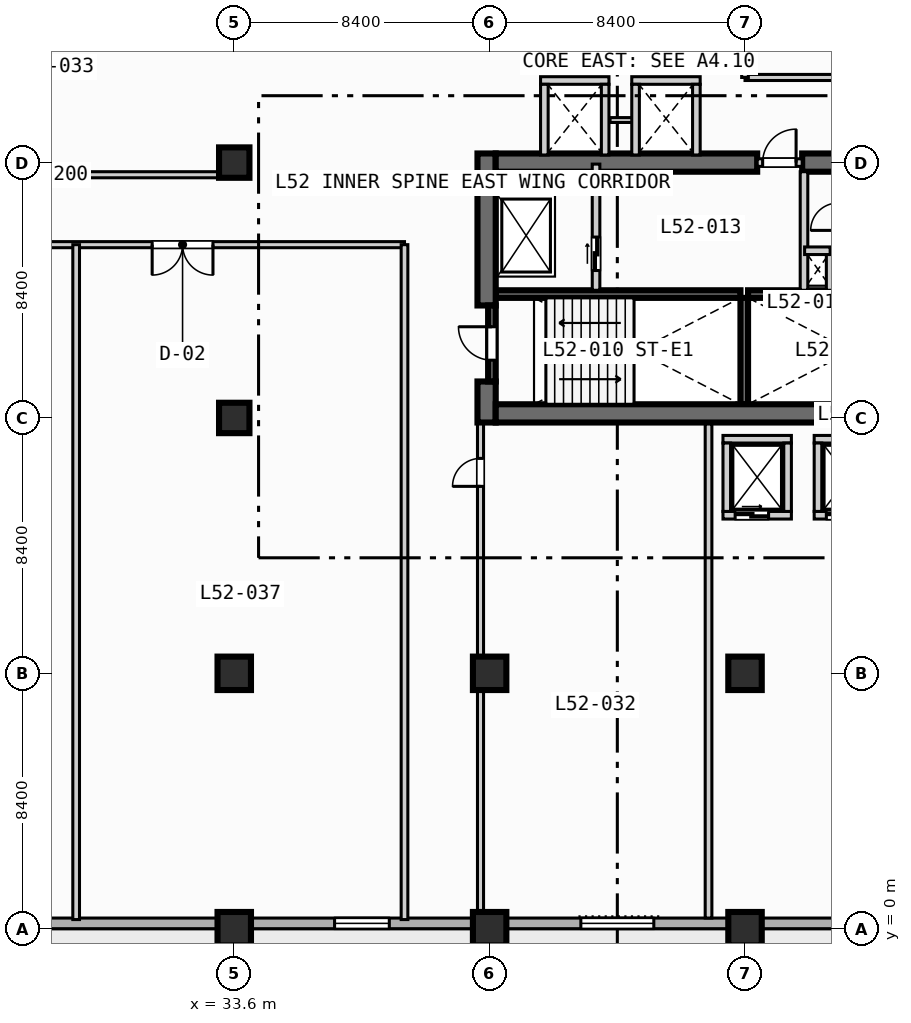
"""IFC4 building model, lengths in metres.
Left out: names, types, materials, properties, quantities, classifications, styles, units other than length and angle.
Written with IfcOpenShell. Run it as: python <this file> out.ifc"""

import sys

from ifc_helpers import new_model, si_unit, direction, frame, frame_2d, origin, origin_2d, place, context, subcontext, project, spatial, rectangle, extrude, element, fill, save


model = new_model("IFC4")
c1 = context("Model", 3, precision=1e-05, world=origin(), true_north=direction((0.0, 1.0)))
c2 = subcontext(c1, "Body", "Model", "MODEL_VIEW")
j1 = project(units=[si_unit("LENGTHUNIT", "METRE"), si_unit("PLANEANGLEUNIT", "RADIAN")], contexts=[c1])
p1 = place(None, origin())
s1 = spatial("IfcSite", under=j1, at=p1, CompositionType="ELEMENT")
p2 = place(p1, origin())
s2 = spatial("IfcBuilding", under=s1, at=p2, CompositionType="ELEMENT")
p3 = place(p2, frame((0.0, 0.0, 212.4)))
s3 = spatial("IfcBuildingStorey", under=s2, at=p3, CompositionType="ELEMENT", Elevation=212.4)
for number, where, z_axis, x_axis in (
    (1, (42.2, 20.875, 0.0), (0.0, 0.0, 1.0), (1.0, 0.0, 0.0)),
    (2, (50.5, 20.875, 0.0), (0.0, 0.0, 1.0), (1.0, 0.0, 0.0)),
):
    element("IfcWall", number, at=place(p3, frame(where, z_axis=z_axis, x_axis=x_axis)), inside=s3, PredefinedType="SOLIDWALL", context=c2, shape_type="SweptSolid", body=[
        extrude(rectangle(XDim=8.05, YDim=0.25, at=frame_2d((4.025, 0.0))), origin(), (0.0, 0.0, 1.0), 3.47),
    ])
p4 = place(p3, frame((50.375, 17.25, 0.0), z_axis=(0.0, 0.0, 1.0), x_axis=(0.0, 1.0, 0.0)))
e3 = element("IfcWall", 3, at=p4, inside=s3, PredefinedType="SOLIDWALL", context=c2, shape_type="SweptSolid", body=[
    extrude(rectangle(XDim=3.5, YDim=0.25, at=frame_2d((1.75, 0.0))), origin(), (0.0, 0.0, 1.0), 3.47),
])
p5 = place(p3, frame((41.9, 16.65, 0.0), z_axis=(0.0, 0.0, 1.0), x_axis=(0.0, 1.0, 0.0)))
e4 = element("IfcWall", 4, at=p5, inside=s3, PredefinedType="SHEAR", context=c2, shape_type="SweptSolid", body=[
    extrude(rectangle(XDim=1.35, YDim=0.6, at=frame_2d((0.675, 0.0))), origin(), (0.0, 0.0, 1.0), 3.47),
])
p6 = place(p3, frame((41.9, 20.5, 0.0), z_axis=(0.0, 0.0, 1.0), x_axis=(0.0, 1.0, 0.0)))
e5 = element("IfcWall", 5, at=p6, inside=s3, PredefinedType="SHEAR", context=c2, shape_type="SweptSolid", body=[
    extrude(rectangle(XDim=5.0, YDim=0.6, at=frame_2d((2.5, 0.0))), origin(), (0.0, 0.0, 1.0), 3.47),
])
p7 = place(p3, frame((42.2, 16.95, 0.0), z_axis=(0.0, 0.0, 1.0), x_axis=(1.0, 0.0, 0.0)))
e6 = element("IfcWall", 6, at=p7, inside=s3, PredefinedType="SHEAR", context=c2, shape_type="SweptSolid", body=[
    extrude(rectangle(XDim=16.35, YDim=0.6, at=frame_2d((8.175, 0.0))), origin(), (0.0, 0.0, 1.0), 3.47),
])
p8 = place(p3, frame((42.2, 25.2, 0.0), z_axis=(0.0, 0.0, 1.0), x_axis=(1.0, 0.0, 0.0)))
e7 = element("IfcWall", 7, at=p8, inside=s3, PredefinedType="SHEAR", context=c2, shape_type="SweptSolid", body=[
    extrude(rectangle(XDim=8.6, YDim=0.6, at=frame_2d((4.3, 0.0))), origin(), (0.0, 0.0, 1.0), 3.47),
])
p9 = place(p3, frame((52.28, 25.2, 0.0), z_axis=(0.0, 0.0, 1.0), x_axis=(1.0, 0.0, 0.0)))
e8 = element("IfcWall", 8, at=p9, inside=s3, PredefinedType="SHEAR", context=c2, shape_type="SweptSolid", body=[
    extrude(rectangle(XDim=1.27, YDim=0.6, at=frame_2d((0.635, 0.0))), origin(), (0.0, 0.0, 1.0), 3.47),
])
for number, where, z_axis, x_axis in (
    (9, (33.6, 0.0, 0.0), (0.0, 0.0, 1.0), (1.0, 0.0, 0.0)),
    (10, (33.6, 8.4, 0.0), (0.0, 0.0, 1.0), (1.0, 0.0, 0.0)),
):
    element("IfcColumn", number, at=place(p3, frame(where, z_axis=z_axis, x_axis=x_axis)), inside=s3, PredefinedType="COLUMN", context=c2, shape_type="SweptSolid", body=[
        extrude(rectangle(XDim=1.1, YDim=1.1, at=origin_2d()), origin(), (0.0, 0.0, 1.0), 3.7),
    ])
for number, where, z_axis, x_axis in (
    (11, (33.6, 16.8, 0.0), (0.0, 0.0, 1.0), (1.0, 0.0, 0.0)),
    (12, (33.6, 25.2, 0.0), (0.0, 0.0, 1.0), (1.0, 0.0, 0.0)),
):
    element("IfcColumn", number, at=place(p3, frame(where, z_axis=z_axis, x_axis=x_axis)), inside=s3, PredefinedType="COLUMN", context=c2, shape_type="SweptSolid", body=[
        extrude(rectangle(XDim=1.0, YDim=1.0, at=origin_2d()), origin(), (0.0, 0.0, 1.0), 3.7),
    ])
for number, where, z_axis, x_axis in (
    (13, (42.0, 0.0, 0.0), (0.0, 0.0, 1.0), (1.0, 0.0, 0.0)),
    (14, (42.0, 8.4, 0.0), (0.0, 0.0, 1.0), (1.0, 0.0, 0.0)),
    (15, (50.4, 0.0, 0.0), (0.0, 0.0, 1.0), (1.0, 0.0, 0.0)),
    (16, (50.4, 8.4, 0.0), (0.0, 0.0, 1.0), (1.0, 0.0, 0.0)),
):
    element("IfcColumn", number, at=place(p3, frame(where, z_axis=z_axis, x_axis=x_axis)), inside=s3, PredefinedType="COLUMN", context=c2, shape_type="SweptSolid", body=[
        extrude(rectangle(XDim=1.1, YDim=1.1, at=origin_2d()), origin(), (0.0, 0.0, 1.0), 3.7),
    ])
p10 = place(p3, frame((72.425, 0.175, 0.0), z_axis=(0.0, 0.0, 1.0), x_axis=(-1.0, 0.0, 0.0)))
e17 = element("IfcWall", 17, at=p10, inside=s3, PredefinedType="STANDARD", context=c2, shape_type="SweptSolid", body=[
    extrude(rectangle(XDim=69.25, YDim=0.35, at=frame_2d((34.625, 0.0))), origin(), (0.0, 0.0, 1.0), 3.47),
])
p11 = place(p10, frame((50.725, 0.0, 0.0)))
e18 = element("IfcOpeningElement", 18, at=p11, cuts=e17, PredefinedType="OPENING", context=c2, shape_type="SweptSolid", body=[
    extrude(rectangle(XDim=1.4, YDim=2.2, at=frame_2d((0.7, 1.1))), frame((0.0, 0.185, 0.0), z_axis=(0.0, -1.0, 0.0), x_axis=(1.0, 0.0, 0.0)), (0.0, 0.0, 1.0), 0.37),
])
p12 = place(p10, frame((58.625, 0.0, 0.85)))
e19 = element("IfcOpeningElement", 19, at=p12, cuts=e17, PredefinedType="OPENING", context=c2, shape_type="SweptSolid", body=[
    extrude(rectangle(XDim=2.4, YDim=1.95, at=frame_2d((1.2, 0.975))), frame((0.0, 0.185, 0.0), z_axis=(0.0, -1.0, 0.0), x_axis=(1.0, 0.0, 0.0)), (0.0, 0.0, 1.0), 0.37),
])
p13 = place(p10, frame((33.725, 0.0, 0.85)))
e20 = element("IfcOpeningElement", 20, at=p13, cuts=e17, PredefinedType="OPENING", context=c2, shape_type="SweptSolid", body=[
    extrude(rectangle(XDim=1.8, YDim=1.8, at=frame_2d((0.9, 0.9))), frame((0.0, 0.185, 0.0), z_axis=(0.0, -1.0, 0.0), x_axis=(1.0, 0.0, 0.0)), (0.0, 0.0, 1.0), 0.37),
])
p14 = place(p10, frame((25.025, 0.0, 0.85)))
e21 = element("IfcOpeningElement", 21, at=p14, cuts=e17, PredefinedType="OPENING", context=c2, shape_type="SweptSolid", body=[
    extrude(rectangle(XDim=2.4, YDim=1.95, at=frame_2d((1.2, 0.975))), frame((0.0, 0.185, 0.0), z_axis=(0.0, -1.0, 0.0), x_axis=(1.0, 0.0, 0.0)), (0.0, 0.0, 1.0), 0.37),
])
p15 = place(p10, frame((9.075, 0.0, 0.85)))
e22 = element("IfcOpeningElement", 22, at=p15, cuts=e17, PredefinedType="OPENING", context=c2, shape_type="SweptSolid", body=[
    extrude(rectangle(XDim=1.8, YDim=1.8, at=frame_2d((0.9, 0.9))), frame((0.0, 0.185, 0.0), z_axis=(0.0, -1.0, 0.0), x_axis=(1.0, 0.0, 0.0)), (0.0, 0.0, 1.0), 0.37),
])
p16 = place(p10, frame((2.675, 0.0, 0.85)))
e23 = element("IfcOpeningElement", 23, at=p16, cuts=e17, PredefinedType="OPENING", context=c2, shape_type="SweptSolid", body=[
    extrude(rectangle(XDim=1.8, YDim=1.8, at=frame_2d((0.9, 0.9))), frame((0.0, 0.185, 0.0), z_axis=(0.0, -1.0, 0.0), x_axis=(1.0, 0.0, 0.0)), (0.0, 0.0, 1.0), 0.37),
])
p17 = place(p3, frame((42.075, 18.0, 0.0), z_axis=(0.0, 0.0, 1.0), x_axis=(0.0, 1.0, 0.0)))
e24 = element("IfcWall", 24, at=p17, inside=s3, PredefinedType="SOLIDWALL", context=c2, shape_type="SweptSolid", body=[
    extrude(rectangle(XDim=2.5, YDim=0.25, at=frame_2d((1.25, 0.0))), origin(), (0.0, 0.0, 1.0), 3.47),
])
p18 = place(p17, frame((0.7, 0.0, 0.0)))
e25 = element("IfcOpeningElement", 25, at=p18, cuts=e24, PredefinedType="OPENING", context=c2, shape_type="SweptSolid", body=[
    extrude(rectangle(XDim=1.1, YDim=2.15, at=frame_2d((0.55, 1.075))), frame((0.0, 0.135, 0.0), z_axis=(0.0, -1.0, 0.0), x_axis=(1.0, 0.0, 0.0)), (0.0, 0.0, 1.0), 0.27),
])
p19 = place(p3, frame((45.5, 21.0, 0.0), z_axis=(0.0, 0.0, 1.0), x_axis=(0.0, 1.0, 0.0)))
e26 = element("IfcWall", 26, at=p19, inside=s3, PredefinedType="SOLIDWALL", context=c2, shape_type="SweptSolid", body=[
    extrude(rectangle(XDim=4.15, YDim=0.25, at=frame_2d((2.075, 0.0))), origin(), (0.0, 0.0, 1.0), 3.47),
])
p20 = place(p19, frame((0.65, 0.0, 0.0)))
e27 = element("IfcOpeningElement", 27, at=p20, cuts=e26, PredefinedType="OPENING", context=c2, shape_type="SweptSolid", body=[
    extrude(rectangle(XDim=1.1, YDim=2.15, at=frame_2d((0.55, 1.075))), frame((0.0, 0.135, 0.0), z_axis=(0.0, -1.0, 0.0), x_axis=(1.0, 0.0, 0.0)), (0.0, 0.0, 1.0), 0.27),
])
p21 = place(p3, frame((50.8, 25.2, 0.0), z_axis=(0.0, 0.0, 1.0), x_axis=(1.0, 0.0, 0.0)))
e28 = element("IfcWall", 28, at=p21, inside=s3, PredefinedType="SOLIDWALL", context=c2, shape_type="SweptSolid", body=[
    extrude(rectangle(XDim=1.48, YDim=0.25, at=frame_2d((0.74, 0.0))), origin(), (0.0, 0.0, 1.0), 3.47),
])
p22 = place(p21, frame((0.18, 0.0, 0.0)))
e29 = element("IfcOpeningElement", 29, at=p22, cuts=e28, PredefinedType="OPENING", context=c2, shape_type="SweptSolid", body=[
    extrude(rectangle(XDim=1.1, YDim=2.15, at=frame_2d((0.55, 1.075))), frame((0.0, 0.135, 0.0), z_axis=(0.0, -1.0, 0.0), x_axis=(1.0, 0.0, 0.0)), (0.0, 0.0, 1.0), 0.27),
])
p23 = place(p3, frame((52.34, 21.0, 0.0), z_axis=(0.0, 0.0, 1.0), x_axis=(0.0, 1.0, 0.0)))
e30 = element("IfcWall", 30, at=p23, inside=s3, PredefinedType="SOLIDWALL", context=c2, shape_type="SweptSolid", body=[
    extrude(rectangle(XDim=3.9, YDim=0.25, at=frame_2d((1.95, 0.0))), origin(), (0.0, 0.0, 1.0), 3.47),
])
p24 = place(p3, frame((53.2, 21.0, 0.0), z_axis=(0.0, 0.0, 1.0), x_axis=(0.0, 1.0, 0.0)))
e31 = element("IfcWall", 31, at=p24, inside=s3, PredefinedType="SOLIDWALL", context=c2, shape_type="SweptSolid", body=[
    extrude(rectangle(XDim=1.3, YDim=0.25, at=frame_2d((0.65, 0.0))), origin(), (0.0, 0.0, 1.0), 3.47),
])
p25 = place(p3, frame((52.36, 22.3, 0.0), z_axis=(0.0, 0.0, 1.0), x_axis=(1.0, 0.0, 0.0)))
e32 = element("IfcWall", 32, at=p25, inside=s3, PredefinedType="SOLIDWALL", context=c2, shape_type="SweptSolid", body=[
    extrude(rectangle(XDim=0.84, YDim=0.25, at=frame_2d((0.42, 0.0))), origin(), (0.0, 0.0, 1.0), 3.47),
])
p26 = place(p3, frame((49.675, 13.6, 0.0), z_axis=(0.0, 0.0, 1.0), x_axis=(1.0, 0.0, 0.0)))
e33 = element("IfcWall", 33, at=p26, inside=s3, PredefinedType="SOLIDWALL", context=c2, shape_type="SweptSolid", body=[
    extrude(rectangle(XDim=2.25, YDim=0.25, at=frame_2d((1.125, 0.0))), origin(), (0.0, 0.0, 1.0), 3.47),
])
p27 = place(p26, frame((0.4, 0.0, 0.0)))
e34 = element("IfcOpeningElement", 34, at=p27, cuts=e33, PredefinedType="OPENING", context=c2, shape_type="SweptSolid", body=[
    extrude(rectangle(XDim=1.1, YDim=2.15, at=frame_2d((0.55, 1.075))), frame((0.0, 0.135, 0.0), z_axis=(0.0, -1.0, 0.0), x_axis=(1.0, 0.0, 0.0)), (0.0, 0.0, 1.0), 0.27),
])
for number, where, z_axis, x_axis in (
    (35, (49.675, 16.1, 0.0), (0.0, 0.0, 1.0), (1.0, 0.0, 0.0)),
    (36, (49.8, 13.725, 0.0), (0.0, 0.0, 1.0), (0.0, 1.0, 0.0)),
    (37, (51.8, 13.725, 0.0), (0.0, 0.0, 1.0), (0.0, 1.0, 0.0)),
):
    element("IfcWall", number, at=place(p3, frame(where, z_axis=z_axis, x_axis=x_axis)), inside=s3, PredefinedType="SOLIDWALL", context=c2, shape_type="SweptSolid", body=[
        extrude(rectangle(XDim=2.25, YDim=0.25, at=frame_2d((1.125, 0.0))), origin(), (0.0, 0.0, 1.0), 3.47),
    ])
p28 = place(p3, frame((52.675, 13.6, 0.0), z_axis=(0.0, 0.0, 1.0), x_axis=(1.0, 0.0, 0.0)))
e38 = element("IfcWall", 38, at=p28, inside=s3, PredefinedType="SOLIDWALL", context=c2, shape_type="SweptSolid", body=[
    extrude(rectangle(XDim=2.25, YDim=0.25, at=frame_2d((1.125, 0.0))), origin(), (0.0, 0.0, 1.0), 3.47),
])
p29 = place(p28, frame((0.4, 0.0, 0.0)))
e39 = element("IfcOpeningElement", 39, at=p29, cuts=e38, PredefinedType="OPENING", context=c2, shape_type="SweptSolid", body=[
    extrude(rectangle(XDim=1.1, YDim=2.15, at=frame_2d((0.55, 1.075))), frame((0.0, 0.135, 0.0), z_axis=(0.0, -1.0, 0.0), x_axis=(1.0, 0.0, 0.0)), (0.0, 0.0, 1.0), 0.27),
])
for number, where, z_axis, x_axis in (
    (40, (52.675, 16.1, 0.0), (0.0, 0.0, 1.0), (1.0, 0.0, 0.0)),
    (41, (52.8, 13.725, 0.0), (0.0, 0.0, 1.0), (0.0, 1.0, 0.0)),
    (42, (43.675, 27.9, 0.0), (0.0, 0.0, 1.0), (1.0, 0.0, 0.0)),
):
    element("IfcWall", number, at=place(p3, frame(where, z_axis=z_axis, x_axis=x_axis)), inside=s3, PredefinedType="SOLIDWALL", context=c2, shape_type="SweptSolid", body=[
        extrude(rectangle(XDim=2.25, YDim=0.25, at=frame_2d((1.125, 0.0))), origin(), (0.0, 0.0, 1.0), 3.47),
    ])
for number, where, z_axis, x_axis in (
    (43, (43.8, 25.45, 0.0), (0.0, 0.0, 1.0), (0.0, 1.0, 0.0)),
    (44, (45.8, 25.45, 0.0), (0.0, 0.0, 1.0), (0.0, 1.0, 0.0)),
):
    element("IfcWall", number, at=place(p3, frame(where, z_axis=z_axis, x_axis=x_axis)), inside=s3, PredefinedType="SOLIDWALL", context=c2, shape_type="SweptSolid", body=[
        extrude(rectangle(XDim=2.325, YDim=0.25, at=frame_2d((1.163, 0.0))), origin(), (0.0, 0.0, 1.0), 3.47),
    ])
p30 = place(p3, frame((45.96, 26.6, 0.0), z_axis=(0.0, 0.0, 1.0), x_axis=(1.0, 0.0, 0.0)))
e45 = element("IfcWall", 45, at=p30, inside=s3, PredefinedType="PARTITIONING", context=c2, shape_type="SweptSolid", body=[
    extrude(rectangle(XDim=0.88, YDim=0.16, at=frame_2d((0.44, 0.0))), origin(), (0.0, 0.0, 1.0), 3.47),
])
p31 = place(p3, frame((46.675, 27.9, 0.0), z_axis=(0.0, 0.0, 1.0), x_axis=(1.0, 0.0, 0.0)))
e46 = element("IfcWall", 46, at=p31, inside=s3, PredefinedType="SOLIDWALL", context=c2, shape_type="SweptSolid", body=[
    extrude(rectangle(XDim=2.25, YDim=0.25, at=frame_2d((1.125, 0.0))), origin(), (0.0, 0.0, 1.0), 3.47),
])
for number, where, z_axis, x_axis in (
    (47, (46.8, 25.45, 0.0), (0.0, 0.0, 1.0), (0.0, 1.0, 0.0)),
    (48, (48.8, 25.45, 0.0), (0.0, 0.0, 1.0), (0.0, 1.0, 0.0)),
):
    element("IfcWall", number, at=place(p3, frame(where, z_axis=z_axis, x_axis=x_axis)), inside=s3, PredefinedType="SOLIDWALL", context=c2, shape_type="SweptSolid", body=[
        extrude(rectangle(XDim=2.325, YDim=0.25, at=frame_2d((1.163, 0.0))), origin(), (0.0, 0.0, 1.0), 3.47),
    ])
p32 = place(p3, frame((41.7, 0.35, 0.0), z_axis=(0.0, 0.0, 1.0), x_axis=(0.0, 1.0, 0.0)))
e49 = element("IfcWall", 49, at=p32, inside=s3, PredefinedType="PARTITIONING", context=c2, shape_type="SweptSolid", body=[
    extrude(rectangle(XDim=16.25, YDim=0.2, at=frame_2d((8.125, 0.0))), origin(), (0.0, 0.0, 1.0), 2.82),
])
p33 = place(p32, frame((14.2, 0.0, 0.0)))
e50 = element("IfcOpeningElement", 50, at=p33, cuts=e49, PredefinedType="OPENING", context=c2, shape_type="SweptSolid", body=[
    extrude(rectangle(XDim=0.92, YDim=2.1, at=frame_2d((0.46, 1.05))), frame((0.0, 0.11, 0.0), z_axis=(0.0, -1.0, 0.0), x_axis=(1.0, 0.0, 0.0)), (0.0, 0.0, 1.0), 0.22),
])
p34 = place(p3, frame((49.2, 0.35, 0.0), z_axis=(0.0, 0.0, 1.0), x_axis=(0.0, 1.0, 0.0)))
e51 = element("IfcWall", 51, at=p34, inside=s3, PredefinedType="PARTITIONING", context=c2, shape_type="SweptSolid", body=[
    extrude(rectangle(XDim=16.25, YDim=0.22, at=frame_2d((8.125, 0.0))), origin(), (0.0, 0.0, 1.0), 3.47),
])
p35 = place(p3, frame((22.0, 24.8, 0.0), z_axis=(0.0, 0.0, 1.0), x_axis=(1.0, 0.0, 0.0)))
e52 = element("IfcWall", 52, at=p35, inside=s3, PredefinedType="PARTITIONING", context=c2, shape_type="SweptSolid", body=[
    extrude(rectangle(XDim=11.3, YDim=0.2, at=frame_2d((5.65, 0.0))), origin(), (0.0, 0.0, 1.0), 3.47),
])
p36 = place(p3, frame((3.4, 22.5, 0.0), z_axis=(0.0, 0.0, 1.0), x_axis=(1.0, 0.0, 0.0)))
e53 = element("IfcWall", 53, at=p36, inside=s3, PredefinedType="PARTITIONING", context=c2, shape_type="SweptSolid", body=[
    extrude(rectangle(XDim=35.8, YDim=0.2, at=frame_2d((17.9, 0.0))), origin(), (0.0, 0.0, 1.0), 3.47),
])
p37 = place(p36, frame((4.0, 0.0, 0.0)))
e54 = element("IfcOpeningElement", 54, at=p37, cuts=e53, PredefinedType="OPENING", context=c2, shape_type="SweptSolid", body=[
    extrude(rectangle(XDim=0.92, YDim=2.1, at=frame_2d((0.46, 1.05))), frame((0.0, 0.11, 0.0), z_axis=(0.0, -1.0, 0.0), x_axis=(1.0, 0.0, 0.0)), (0.0, 0.0, 1.0), 0.22),
])
p38 = place(p36, frame((17.5, 0.0, 0.0)))
e55 = element("IfcOpeningElement", 55, at=p38, cuts=e53, PredefinedType="OPENING", context=c2, shape_type="SweptSolid", body=[
    extrude(rectangle(XDim=2.0, YDim=2.15, at=frame_2d((1.0, 1.075))), frame((0.0, 0.11, 0.0), z_axis=(0.0, -1.0, 0.0), x_axis=(1.0, 0.0, 0.0)), (0.0, 0.0, 1.0), 0.22),
])
p39 = place(p36, frame((27.5, 0.0, 0.0)))
e56 = element("IfcOpeningElement", 56, at=p39, cuts=e53, PredefinedType="OPENING", context=c2, shape_type="SweptSolid", body=[
    extrude(rectangle(XDim=2.0, YDim=2.15, at=frame_2d((1.0, 1.075))), frame((0.0, 0.11, 0.0), z_axis=(0.0, -1.0, 0.0), x_axis=(1.0, 0.0, 0.0)), (0.0, 0.0, 1.0), 0.22),
])
for number, where, z_axis, x_axis in (
    (57, (28.4, 0.3, 0.0), (0.0, 0.0, 1.0), (0.0, 1.0, 0.0)),
    (58, (39.2, 0.3, 0.0), (0.0, 0.0, 1.0), (0.0, 1.0, 0.0)),
):
    element("IfcWall", number, at=place(p3, frame(where, z_axis=z_axis, x_axis=x_axis)), inside=s3, PredefinedType="PARTITIONING", context=c2, shape_type="SweptSolid", body=[
        extrude(rectangle(XDim=22.2, YDim=0.22, at=frame_2d((11.1, 0.0))), origin(), (0.0, 0.0, 1.0), 3.47),
    ])
p40 = place(p3, frame((50.4, 28.0, 0.0), z_axis=(0.0, 0.0, 1.0), x_axis=(1.0, 0.0, 0.0)))
e59 = element("IfcWall", 59, at=p40, inside=s3, PredefinedType="PARTITIONING", context=c2, shape_type="SweptSolid", body=[
    extrude(rectangle(XDim=21.8, YDim=0.2, at=frame_2d((10.9, 0.0))), origin(), (0.0, 0.0, 1.0), 3.47),
])
p41 = place(p40, frame((4.0, 0.0, 0.0)))
e60 = element("IfcOpeningElement", 60, at=p41, cuts=e59, PredefinedType="OPENING", context=c2, shape_type="SweptSolid", body=[
    extrude(rectangle(XDim=0.92, YDim=2.1, at=frame_2d((0.46, 1.05))), frame((0.0, 0.11, 0.0), z_axis=(0.0, -1.0, 0.0), x_axis=(1.0, 0.0, 0.0)), (0.0, 0.0, 1.0), 0.22),
])
p42 = place(p3, frame((50.4, 28.0, 0.0), z_axis=(0.0, 0.0, 1.0), x_axis=(0.0, 1.0, 0.0)))
e61 = element("IfcWall", 61, at=p42, inside=s3, PredefinedType="PARTITIONING", context=c2, shape_type="SweptSolid", body=[
    extrude(rectangle(XDim=5.3, YDim=0.22, at=frame_2d((2.65, 0.0))), origin(), (0.0, 0.0, 1.0), 2.82),
])
p43 = place(p13, origin())
e62 = element("IfcWindow", 62, at=p43, inside=s3, PartitioningType="SINGLE_PANEL", PredefinedType="WINDOW", context=c2, shape_type="SweptSolid", body=[
    extrude(rectangle(XDim=1.8, YDim=1.8, at=frame_2d((0.9, 0.9))), frame((0.0, 0.03, 0.0), z_axis=(0.0, -1.0, 0.0), x_axis=(1.0, 0.0, 0.0)), (0.0, 0.0, 1.0), 0.06),
])
fill(e20, e62)
p44 = place(p14, origin())
e63 = element("IfcWindow", 63, at=p44, inside=s3, PartitioningType="SINGLE_PANEL", PredefinedType="WINDOW", context=c2, shape_type="SweptSolid", body=[
    extrude(rectangle(XDim=2.4, YDim=1.95, at=frame_2d((1.2, 0.975))), frame((0.0, 0.03, 0.0), z_axis=(0.0, -1.0, 0.0), x_axis=(1.0, 0.0, 0.0)), (0.0, 0.0, 1.0), 0.06),
])
fill(e21, e63)
p45 = place(p18, origin())
e64 = element("IfcDoor", 64, at=p45, inside=s3, OperationType="SINGLE_SWING_RIGHT", PredefinedType="DOOR", context=c2, shape_type="SweptSolid", body=[
    extrude(rectangle(XDim=1.1, YDim=2.15, at=frame_2d((0.55, 1.075))), frame((0.0, 0.025, 0.0), z_axis=(0.0, -1.0, 0.0), x_axis=(1.0, 0.0, 0.0)), (0.0, 0.0, 1.0), 0.05),
])
fill(e25, e64)
p46 = place(p20, origin())
e65 = element("IfcDoor", 65, at=p46, inside=s3, OperationType="SLIDING_TO_LEFT", PredefinedType="DOOR", context=c2, shape_type="SweptSolid", body=[
    extrude(rectangle(XDim=1.1, YDim=2.15, at=frame_2d((0.55, 1.075))), frame((0.0, 0.025, 0.0), z_axis=(0.0, -1.0, 0.0), x_axis=(1.0, 0.0, 0.0)), (0.0, 0.0, 1.0), 0.05),
])
fill(e27, e65)
p47 = place(p22, origin())
e66 = element("IfcDoor", 66, at=p47, inside=s3, OperationType="SINGLE_SWING_RIGHT", PredefinedType="DOOR", context=c2, shape_type="SweptSolid", body=[
    extrude(rectangle(XDim=1.1, YDim=2.15, at=frame_2d((0.55, 1.075))), frame((0.0, 0.025, 0.0), z_axis=(0.0, -1.0, 0.0), x_axis=(1.0, 0.0, 0.0)), (0.0, 0.0, 1.0), 0.05),
])
fill(e29, e66)
p48 = place(p27, origin())
e67 = element("IfcDoor", 67, at=p48, inside=s3, OperationType="SLIDING_TO_LEFT", PredefinedType="DOOR", context=c2, shape_type="SweptSolid", body=[
    extrude(rectangle(XDim=1.1, YDim=2.15, at=frame_2d((0.55, 1.075))), frame((0.0, 0.025, 0.0), z_axis=(0.0, -1.0, 0.0), x_axis=(1.0, 0.0, 0.0)), (0.0, 0.0, 1.0), 0.05),
])
fill(e34, e67)
p49 = place(p29, origin())
e68 = element("IfcDoor", 68, at=p49, inside=s3, OperationType="SLIDING_TO_LEFT", PredefinedType="DOOR", context=c2, shape_type="SweptSolid", body=[
    extrude(rectangle(XDim=1.1, YDim=2.15, at=frame_2d((0.55, 1.075))), frame((0.0, 0.025, 0.0), z_axis=(0.0, -1.0, 0.0), x_axis=(1.0, 0.0, 0.0)), (0.0, 0.0, 1.0), 0.05),
])
fill(e39, e68)
p50 = place(p33, origin())
e69 = element("IfcDoor", 69, at=p50, inside=s3, OperationType="SINGLE_SWING_LEFT", PredefinedType="DOOR", context=c2, shape_type="SweptSolid", body=[
    extrude(rectangle(XDim=0.92, YDim=2.1, at=frame_2d((0.46, 1.05))), frame((0.0, 0.025, 0.0), z_axis=(0.0, -1.0, 0.0), x_axis=(1.0, 0.0, 0.0)), (0.0, 0.0, 1.0), 0.05),
])
fill(e50, e69)
p51 = place(p39, origin())
e70 = element("IfcDoor", 70, at=p51, inside=s3, OperationType="SINGLE_SWING_RIGHT", PredefinedType="DOOR", context=c2, shape_type="SweptSolid", body=[
    extrude(rectangle(XDim=2.0, YDim=2.15, at=frame_2d((1.0, 1.075))), frame((0.0, 0.025, 0.0), z_axis=(0.0, -1.0, 0.0), x_axis=(1.0, 0.0, 0.0)), (0.0, 0.0, 1.0), 0.05),
])
fill(e56, e70)
save(model, sys.argv[1])
